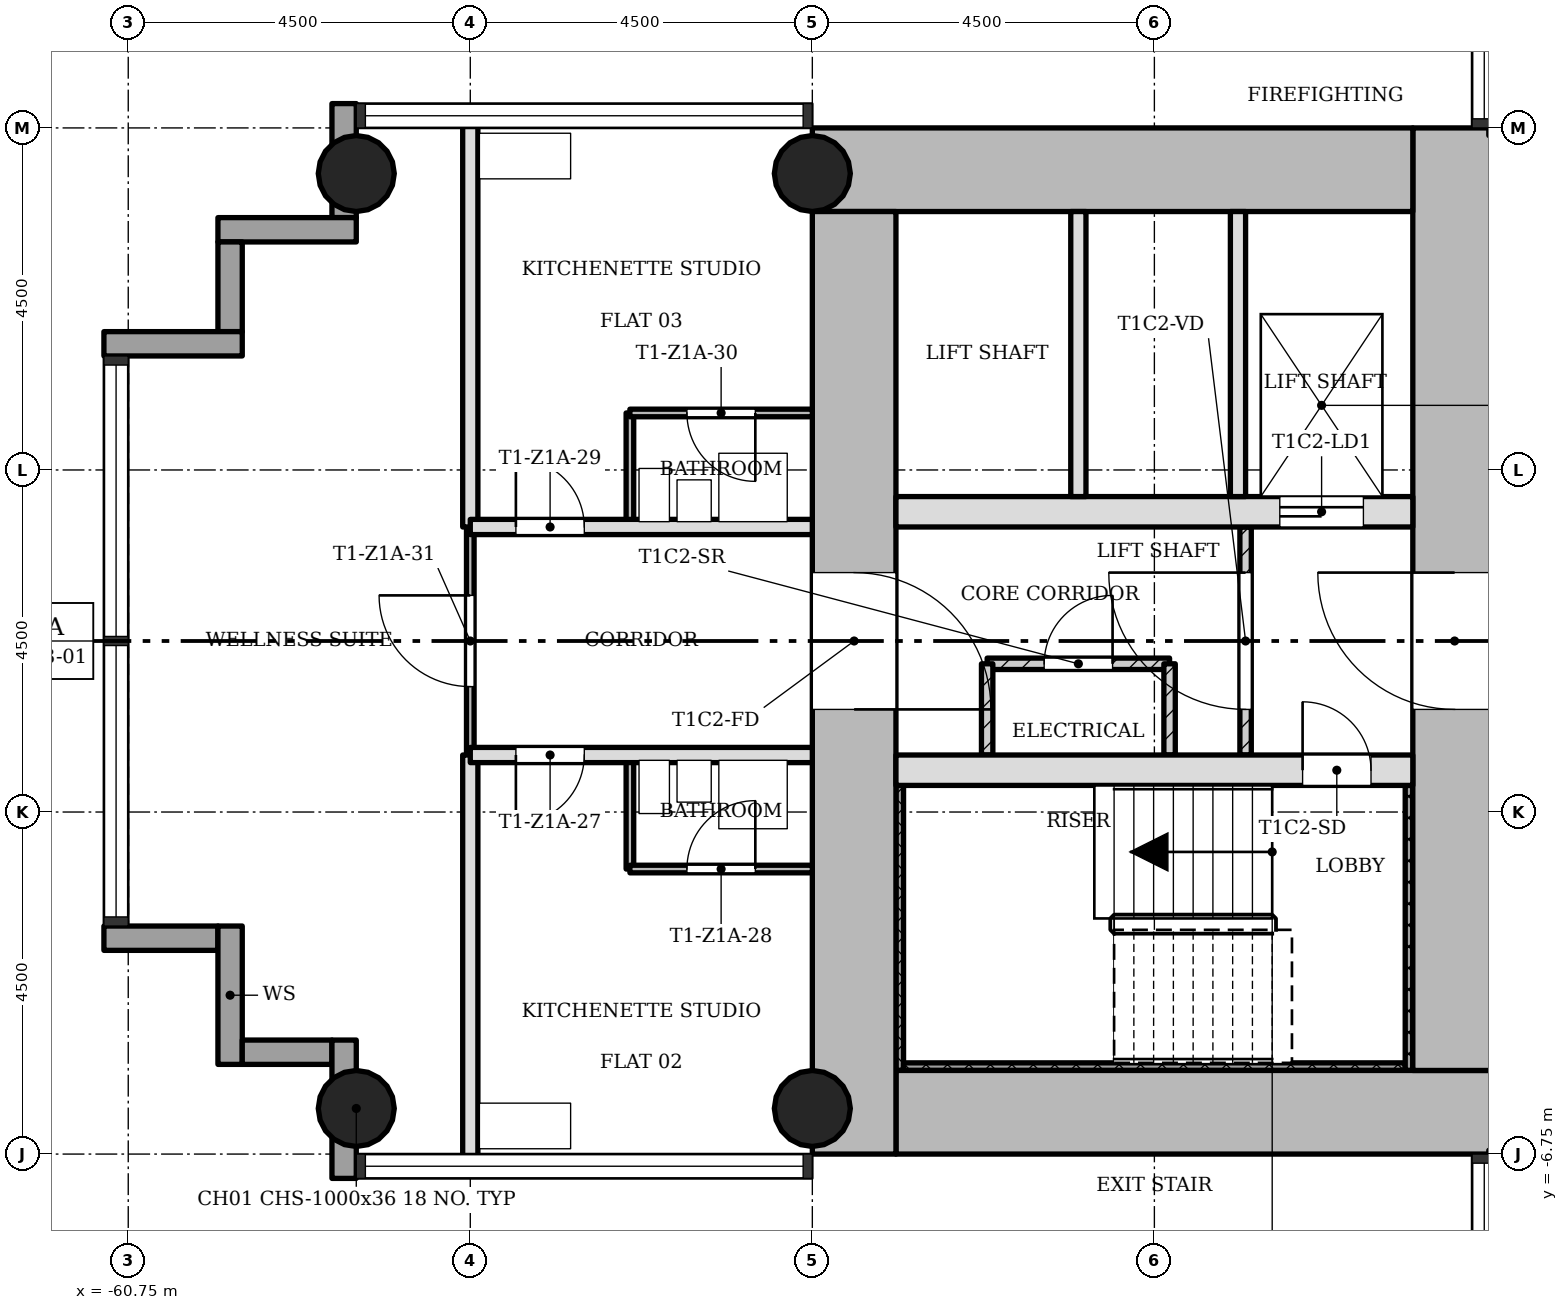
"""IFC4 building model, lengths in metres.
Left out: names, types, materials, properties, quantities, classifications, styles, units other than length and angle.
Written with IfcOpenShell. Run it as: python <this file> out.ifc"""

import sys

from ifc_helpers import new_model, si_unit, direction, frame, frame_2d, origin, origin_2d, place, context, subcontext, project, spatial, rectangle, hollow_circle, extrude, element, fill, save


model = new_model("IFC4")
c1 = context("Model", 3, precision=1e-05, world=origin(), true_north=direction((0.0, 1.0)))
c2 = subcontext(c1, "Body", "Model", "MODEL_VIEW")
j1 = project(units=[si_unit("LENGTHUNIT", "METRE"), si_unit("PLANEANGLEUNIT", "RADIAN")], contexts=[c1])
p1 = place(None, origin())
s1 = spatial("IfcSite", under=j1, at=p1, CompositionType="ELEMENT")
p2 = place(p1, origin())
s2 = spatial("IfcBuilding", under=s1, at=p2, CompositionType="ELEMENT")
p3 = place(p2, frame((0.0, 0.0, 27.9)))
s3 = spatial("IfcBuildingStorey", under=s2, at=p3, CompositionType="ELEMENT", Elevation=27.9)
p4 = place(p3, frame((-50.65, -6.2, 0.0), z_axis=(0.0, 0.0, 1.0), x_axis=(1.0, 0.0, 0.0)))
e1 = element("IfcWall", 1, at=p4, inside=s3, PredefinedType="SHEAR", context=c2, shape_type="SweptSolid", body=[
    extrude(rectangle(XDim=7.998, YDim=1.1, at=frame_2d((3.999, 0.0))), origin(), (0.0, 0.0, 1.0), 3.4),
])
p5 = place(p3, frame((-43.3, -5.65, 0.0), z_axis=(0.0, 0.0, 1.0), x_axis=(0.0, 1.0, 0.0)))
e2 = element("IfcWall", 2, at=p5, inside=s3, PredefinedType="SHEAR", context=c2, shape_type="SweptSolid", body=[
    extrude(rectangle(XDim=12.4, YDim=1.1, at=frame_2d((6.2, 0.0))), origin(), (0.0, 0.0, 1.0), 3.4),
])
p6 = place(p5, frame((4.75, 0.0, 0.0)))
e3 = element("IfcOpeningElement", 3, at=p6, cuts=e2, PredefinedType="OPENING", context=c2, shape_type="SweptSolid", body=[
    extrude(rectangle(XDim=1.8, YDim=2.1, at=frame_2d((0.9, 1.05))), frame((0.0, 0.56, 0.0), z_axis=(0.0, -1.0, 0.0), x_axis=(1.0, 0.0, 0.0)), (0.0, 0.0, 1.0), 1.12),
])
p7 = place(p3, frame((-43.85, 6.2, 0.0), z_axis=(0.0, 0.0, 1.0), x_axis=(-1.0, 0.0, 0.0)))
e4 = element("IfcWall", 4, at=p7, inside=s3, PredefinedType="SHEAR", context=c2, shape_type="SweptSolid", body=[
    extrude(rectangle(XDim=7.9, YDim=1.1, at=frame_2d((3.95, 0.0))), origin(), (0.0, 0.0, 1.0), 3.4),
])
p8 = place(p3, frame((-51.2, 5.65, 0.0), z_axis=(0.0, 0.0, 1.0), x_axis=(0.0, -1.0, 0.0)))
e5 = element("IfcWall", 5, at=p8, inside=s3, PredefinedType="SHEAR", context=c2, shape_type="SweptSolid", body=[
    extrude(rectangle(XDim=12.4, YDim=1.1, at=frame_2d((6.2, 0.0))), origin(), (0.0, 0.0, 1.0), 3.4),
])
p9 = place(p8, frame((4.75, 0.0, 0.0)))
e6 = element("IfcOpeningElement", 6, at=p9, cuts=e5, PredefinedType="OPENING", context=c2, shape_type="SweptSolid", body=[
    extrude(rectangle(XDim=1.8, YDim=2.1, at=frame_2d((0.9, 1.05))), frame((0.0, 0.56, 0.0), z_axis=(0.0, -1.0, 0.0), x_axis=(1.0, 0.0, 0.0)), (0.0, 0.0, 1.0), 1.12),
])
p10 = place(p3, frame((-50.65, -1.7, 0.0), z_axis=(0.0, 0.0, 1.0), x_axis=(1.0, 0.0, 0.0)))
e7 = element("IfcWall", 7, at=p10, inside=s3, PredefinedType="SHEAR", context=c2, shape_type="SweptSolid", body=[
    extrude(rectangle(XDim=6.8, YDim=0.4, at=frame_2d((3.4, 0.0))), origin(), (0.0, 0.0, 1.0), 3.4),
])
p11 = place(p10, frame((5.35, 0.0, 0.0)))
e8 = element("IfcOpeningElement", 8, at=p11, cuts=e7, PredefinedType="OPENING", context=c2, shape_type="SweptSolid", body=[
    extrude(rectangle(XDim=0.9, YDim=2.1, at=frame_2d((0.45, 1.05))), frame((0.0, 0.21, 0.0), z_axis=(0.0, -1.0, 0.0), x_axis=(1.0, 0.0, 0.0)), (0.0, 0.0, 1.0), 0.42),
])
p12 = place(p3, frame((-50.65, 1.7, 0.0), z_axis=(0.0, 0.0, 1.0), x_axis=(1.0, 0.0, 0.0)))
e9 = element("IfcWall", 9, at=p12, inside=s3, PredefinedType="SHEAR", context=c2, shape_type="SweptSolid", body=[
    extrude(rectangle(XDim=6.8, YDim=0.4, at=frame_2d((3.4, 0.0))), origin(), (0.0, 0.0, 1.0), 3.4),
])
p13 = place(p12, frame((5.05, 0.0, 0.0)))
e10 = element("IfcOpeningElement", 10, at=p13, cuts=e9, PredefinedType="OPENING", context=c2, shape_type="SweptSolid", body=[
    extrude(rectangle(XDim=1.1, YDim=2.1, at=frame_2d((0.55, 1.05))), frame((0.0, 0.21, 0.0), z_axis=(0.0, -1.0, 0.0), x_axis=(1.0, 0.0, 0.0)), (0.0, 0.0, 1.0), 0.42),
])
for number, where, z_axis, x_axis in (
    (11, (-51.75, -6.15, 0.0), (0.0, 0.0, 1.0), (1.0, 0.0, 0.0)),
    (12, (-51.75, 6.15, 0.0), (0.0, 0.0, 1.0), (1.0, 0.0, 0.0)),
    (13, (-57.75, -6.15, 0.0), (0.0, 0.0, 1.0), (1.0, 0.0, 0.0)),
    (14, (-57.75, 6.15, 0.0), (0.0, 0.0, 1.0), (1.0, 0.0, 0.0)),
):
    element("IfcColumn", number, at=place(p3, frame(where, z_axis=z_axis, x_axis=x_axis)), inside=s3, PredefinedType="COLUMN", context=c2, shape_type="SweptSolid", body=[
        extrude(hollow_circle(Radius=0.5, WallThickness=0.036, at=origin_2d()), origin(), (0.0, 0.0, 1.0), 3.4),
    ])
p14 = place(p3, frame((-61.07, -3.91, -0.3), z_axis=(0.0, 0.0, 1.0), x_axis=(1.0, 0.0, 0.0)))
e15 = element("IfcWall", 15, at=p14, inside=s3, PredefinedType="STANDARD", context=c2, shape_type="SweptSolid", body=[
    extrude(rectangle(XDim=1.5, YDim=0.32, at=frame_2d((0.75, 0.0))), origin(), (0.0, 0.0, 1.0), 3.4),
])
p15 = place(p3, frame((-59.41, -3.75, -0.3), z_axis=(0.0, 0.0, 1.0), x_axis=(0.0, -1.0, 0.0)))
e16 = element("IfcWall", 16, at=p15, inside=s3, PredefinedType="STANDARD", context=c2, shape_type="SweptSolid", body=[
    extrude(rectangle(XDim=1.82, YDim=0.32, at=frame_2d((0.91, 0.0))), origin(), (0.0, 0.0, 1.0), 3.4),
])
p16 = place(p3, frame((-59.25, -5.41, -0.3), z_axis=(0.0, 0.0, 1.0), x_axis=(1.0, 0.0, 0.0)))
e17 = element("IfcWall", 17, at=p16, inside=s3, PredefinedType="STANDARD", context=c2, shape_type="SweptSolid", body=[
    extrude(rectangle(XDim=1.18, YDim=0.32, at=frame_2d((0.59, 0.0))), origin(), (0.0, 0.0, 1.0), 3.4),
])
p17 = place(p3, frame((-57.91, -5.25, -0.3), z_axis=(0.0, 0.0, 1.0), x_axis=(0.0, -1.0, 0.0)))
e18 = element("IfcWall", 18, at=p17, inside=s3, PredefinedType="STANDARD", context=c2, shape_type="SweptSolid", body=[
    extrude(rectangle(XDim=1.82, YDim=0.32, at=frame_2d((0.91, 0.0))), origin(), (0.0, 0.0, 1.0), 3.4),
])
p18 = place(p3, frame((-57.91, 7.07, -0.3), z_axis=(0.0, 0.0, 1.0), x_axis=(0.0, -1.0, 0.0)))
e19 = element("IfcWall", 19, at=p18, inside=s3, PredefinedType="STANDARD", context=c2, shape_type="SweptSolid", body=[
    extrude(rectangle(XDim=1.5, YDim=0.32, at=frame_2d((0.75, 0.0))), origin(), (0.0, 0.0, 1.0), 3.4),
])
p19 = place(p3, frame((-57.75, 5.41, -0.3), z_axis=(0.0, 0.0, 1.0), x_axis=(-1.0, 0.0, 0.0)))
e20 = element("IfcWall", 20, at=p19, inside=s3, PredefinedType="STANDARD", context=c2, shape_type="SweptSolid", body=[
    extrude(rectangle(XDim=1.82, YDim=0.32, at=frame_2d((0.91, 0.0))), origin(), (0.0, 0.0, 1.0), 3.4),
])
p20 = place(p3, frame((-59.41, 5.25, -0.3), z_axis=(0.0, 0.0, 1.0), x_axis=(0.0, -1.0, 0.0)))
e21 = element("IfcWall", 21, at=p20, inside=s3, PredefinedType="STANDARD", context=c2, shape_type="SweptSolid", body=[
    extrude(rectangle(XDim=1.18, YDim=0.32, at=frame_2d((0.59, 0.0))), origin(), (0.0, 0.0, 1.0), 3.4),
])
p21 = place(p3, frame((-59.25, 3.91, -0.3), z_axis=(0.0, 0.0, 1.0), x_axis=(-1.0, 0.0, 0.0)))
e22 = element("IfcWall", 22, at=p21, inside=s3, PredefinedType="STANDARD", context=c2, shape_type="SweptSolid", body=[
    extrude(rectangle(XDim=1.82, YDim=0.32, at=frame_2d((0.91, 0.0))), origin(), (0.0, 0.0, 1.0), 3.4),
])
p22 = place(p3, frame((-46.05, 1.5, 0.0), z_axis=(0.0, 0.0, 1.0), x_axis=(0.0, -1.0, 0.0)))
e23 = element("IfcWall", 23, at=p22, inside=s3, PredefinedType="PARTITIONING", context=c2, shape_type="SweptSolid", body=[
    extrude(rectangle(XDim=3.0, YDim=0.15, at=frame_2d((1.5, 0.0))), origin(), (0.0, 0.0, 1.0), 3.0),
])
p23 = place(p22, frame((0.6, 0.0, 0.0)))
e24 = element("IfcOpeningElement", 24, at=p23, cuts=e23, PredefinedType="OPENING", context=c2, shape_type="SweptSolid", body=[
    extrude(rectangle(XDim=1.8, YDim=2.1, at=frame_2d((0.9, 1.05))), frame((0.0, 0.085, 0.0), z_axis=(0.0, -1.0, 0.0), x_axis=(1.0, 0.0, 0.0)), (0.0, 0.0, 1.0), 0.17),
])
for number, where, z_axis, x_axis in (
    (25, (-46.15, 5.65, 0.0), (0.0, 0.0, 1.0), (0.0, -1.0, 0.0)),
    (26, (-48.25, 5.65, 0.0), (0.0, 0.0, 1.0), (0.0, -1.0, 0.0)),
):
    element("IfcWall", number, at=place(p3, frame(where, z_axis=z_axis, x_axis=x_axis)), inside=s3, PredefinedType="SOLIDWALL", context=c2, shape_type="SweptSolid", body=[
        extrude(rectangle(XDim=3.75, YDim=0.2, at=frame_2d((1.875, 0.0))), origin(), (0.0, 0.0, 1.0), 3.0),
    ])
p24 = place(p3, frame((-47.05, -0.3, 0.0), z_axis=(0.0, 0.0, 1.0), x_axis=(-1.0, 0.0, 0.0)))
e27 = element("IfcWall", 27, at=p24, inside=s3, PredefinedType="PARTITIONING", context=c2, shape_type="SweptSolid", body=[
    extrude(rectangle(XDim=2.4, YDim=0.15, at=frame_2d((1.2, 0.0))), origin(), (0.0, 0.0, 1.0), 3.0),
])
p25 = place(p24, frame((0.75, 0.0, 0.0)))
e28 = element("IfcOpeningElement", 28, at=p25, cuts=e27, PredefinedType="OPENING", context=c2, shape_type="SweptSolid", body=[
    extrude(rectangle(XDim=0.9, YDim=2.1, at=frame_2d((0.45, 1.05))), frame((0.0, 0.085, 0.0), z_axis=(0.0, -1.0, 0.0), x_axis=(1.0, 0.0, 0.0)), (0.0, 0.0, 1.0), 0.17),
])
for number, where, z_axis, x_axis in (
    (29, (-47.05, -0.3, 0.0), (0.0, 0.0, 1.0), (0.0, -1.0, 0.0)),
    (30, (-49.45, -0.3, 0.0), (0.0, 0.0, 1.0), (0.0, -1.0, 0.0)),
):
    element("IfcWall", number, at=place(p3, frame(where, z_axis=z_axis, x_axis=x_axis)), inside=s3, PredefinedType="PARTITIONING", context=c2, shape_type="SweptSolid", body=[
        extrude(rectangle(XDim=1.2, YDim=0.15, at=frame_2d((0.6, 0.0))), origin(), (0.0, 0.0, 1.0), 3.0),
    ])
p26 = place(p3, frame((-56.25, -1.5, 0.0), z_axis=(0.0, 0.0, 1.0), x_axis=(0.0, 1.0, 0.0)))
e31 = element("IfcWall", 31, at=p26, inside=s3, PredefinedType="PARTITIONING", context=c2, shape_type="SweptSolid", body=[
    extrude(rectangle(XDim=3.0, YDim=0.1, at=frame_2d((1.5, 0.0))), origin(), (0.0, 0.0, 1.0), 3.0),
])
p27 = place(p26, frame((0.9, 0.0, 0.0)))
e32 = element("IfcOpeningElement", 32, at=p27, cuts=e31, PredefinedType="OPENING", context=c2, shape_type="SweptSolid", body=[
    extrude(rectangle(XDim=1.2, YDim=2.1, at=frame_2d((0.6, 1.05))), frame((0.0, 0.06, 0.0), z_axis=(0.0, -1.0, 0.0), x_axis=(1.0, 0.0, 0.0)), (0.0, 0.0, 1.0), 0.12),
])
for number, where, z_axis, x_axis in (
    (33, (-56.25, -6.85, 0.0), (0.0, 0.0, 1.0), (0.0, 1.0, 0.0)),
    (34, (-56.25, 1.5, 0.0), (0.0, 0.0, 1.0), (0.0, 1.0, 0.0)),
):
    element("IfcWall", number, at=place(p3, frame(where, z_axis=z_axis, x_axis=x_axis)), inside=s3, PredefinedType="SOLIDWALL", context=c2, shape_type="SweptSolid", body=[
        extrude(rectangle(XDim=5.35, YDim=0.2, at=frame_2d((2.675, 0.0))), origin(), (0.0, 0.0, 1.0), 3.0),
    ])
for number, where, z_axis, x_axis in (
    (35, (-54.15, -3.0, 0.0), (0.0, 0.0, 1.0), (0.0, 1.0, 0.0)),
    (36, (-54.15, 1.5, 0.0), (0.0, 0.0, 1.0), (0.0, 1.0, 0.0)),
):
    element("IfcWall", number, at=place(p3, frame(where, z_axis=z_axis, x_axis=x_axis)), inside=s3, PredefinedType="PARTITIONING", context=c2, shape_type="SweptSolid", body=[
        extrude(rectangle(XDim=1.5, YDim=0.1, at=frame_2d((0.75, 0.0))), origin(), (0.0, 0.0, 1.0), 3.0),
    ])
p28 = place(p3, frame((-54.15, -3.0, 0.0), z_axis=(0.0, 0.0, 1.0), x_axis=(1.0, 0.0, 0.0)))
e37 = element("IfcWall", 37, at=p28, inside=s3, PredefinedType="PARTITIONING", context=c2, shape_type="SweptSolid", body=[
    extrude(rectangle(XDim=2.4, YDim=0.1, at=frame_2d((1.2, 0.0))), origin(), (0.0, 0.0, 1.0), 3.0),
])
p29 = place(p28, frame((0.75, 0.0, 0.0)))
e38 = element("IfcOpeningElement", 38, at=p29, cuts=e37, PredefinedType="OPENING", context=c2, shape_type="SweptSolid", body=[
    extrude(rectangle(XDim=0.9, YDim=2.1, at=frame_2d((0.45, 1.05))), frame((0.0, 0.06, 0.0), z_axis=(0.0, -1.0, 0.0), x_axis=(1.0, 0.0, 0.0)), (0.0, 0.0, 1.0), 0.12),
])
p30 = place(p3, frame((-56.25, -1.5, 0.0), z_axis=(0.0, 0.0, 1.0), x_axis=(1.0, 0.0, 0.0)))
e39 = element("IfcWall", 39, at=p30, inside=s3, PredefinedType="SOLIDWALL", context=c2, shape_type="SweptSolid", body=[
    extrude(rectangle(XDim=4.5, YDim=0.2, at=frame_2d((2.25, 0.0))), origin(), (0.0, 0.0, 1.0), 3.0),
])
p31 = place(p30, frame((0.6, 0.0, 0.0)))
e40 = element("IfcOpeningElement", 40, at=p31, cuts=e39, PredefinedType="OPENING", context=c2, shape_type="SweptSolid", body=[
    extrude(rectangle(XDim=0.9, YDim=2.1, at=frame_2d((0.45, 1.05))), frame((0.0, 0.11, 0.0), z_axis=(0.0, -1.0, 0.0), x_axis=(1.0, 0.0, 0.0)), (0.0, 0.0, 1.0), 0.22),
])
p32 = place(p3, frame((-56.25, 1.5, 0.0), z_axis=(0.0, 0.0, 1.0), x_axis=(1.0, 0.0, 0.0)))
e41 = element("IfcWall", 41, at=p32, inside=s3, PredefinedType="SOLIDWALL", context=c2, shape_type="SweptSolid", body=[
    extrude(rectangle(XDim=4.5, YDim=0.2, at=frame_2d((2.25, 0.0))), origin(), (0.0, 0.0, 1.0), 3.0),
])
p33 = place(p32, frame((0.6, 0.0, 0.0)))
e42 = element("IfcOpeningElement", 42, at=p33, cuts=e41, PredefinedType="OPENING", context=c2, shape_type="SweptSolid", body=[
    extrude(rectangle(XDim=0.9, YDim=2.1, at=frame_2d((0.45, 1.05))), frame((0.0, 0.11, 0.0), z_axis=(0.0, -1.0, 0.0), x_axis=(1.0, 0.0, 0.0)), (0.0, 0.0, 1.0), 0.22),
])
p34 = place(p3, frame((-54.15, 3.0, 0.0), z_axis=(0.0, 0.0, 1.0), x_axis=(1.0, 0.0, 0.0)))
e43 = element("IfcWall", 43, at=p34, inside=s3, PredefinedType="PARTITIONING", context=c2, shape_type="SweptSolid", body=[
    extrude(rectangle(XDim=2.4, YDim=0.1, at=frame_2d((1.2, 0.0))), origin(), (0.0, 0.0, 1.0), 3.0),
])
p35 = place(p34, frame((0.75, 0.0, 0.0)))
e44 = element("IfcOpeningElement", 44, at=p35, cuts=e43, PredefinedType="OPENING", context=c2, shape_type="SweptSolid", body=[
    extrude(rectangle(XDim=0.9, YDim=2.1, at=frame_2d((0.45, 1.05))), frame((0.0, 0.06, 0.0), z_axis=(0.0, -1.0, 0.0), x_axis=(1.0, 0.0, 0.0)), (0.0, 0.0, 1.0), 0.12),
])
p36 = place(p3, frame((-50.6, -1.9, 0.0), z_axis=(0.0, 0.0, 1.0), x_axis=(0.0, -1.0, 0.0)))
e45 = element("IfcWall", 45, at=p36, inside=s3, PredefinedType="SHEAR", context=c2, shape_type="SweptSolid", body=[
    extrude(rectangle(XDim=3.75, YDim=0.1, at=frame_2d((1.875, 0.0))), origin(), (0.0, 0.0, 1.0), 3.4),
])
p37 = place(p3, frame((-43.95, -5.6, 0.0), z_axis=(0.0, 0.0, 1.0), x_axis=(-1.0, 0.0, 0.0)))
e46 = element("IfcWall", 46, at=p37, inside=s3, PredefinedType="SHEAR", context=c2, shape_type="SweptSolid", body=[
    extrude(rectangle(XDim=6.6, YDim=0.1, at=frame_2d((3.3, 0.0))), origin(), (0.0, 0.0, 1.0), 3.4),
])
p38 = place(p3, frame((-43.9, -1.9, 0.0), z_axis=(0.0, 0.0, 1.0), x_axis=(0.0, -1.0, 0.0)))
e47 = element("IfcWall", 47, at=p38, inside=s3, PredefinedType="SHEAR", context=c2, shape_type="SweptSolid", body=[
    extrude(rectangle(XDim=3.75, YDim=0.1, at=frame_2d((1.875, 0.0))), origin(), (0.0, 0.0, 1.0), 3.4),
])
p39 = place(p23, origin())
e48 = element("IfcDoor", 48, at=p39, inside=s3, OperationType="SINGLE_SWING_LEFT", PredefinedType="DOOR", context=c2, shape_type="SweptSolid", body=[
    extrude(rectangle(XDim=1.8, YDim=2.1, at=frame_2d((0.9, 1.05))), frame((0.0, 0.025, 0.0), z_axis=(0.0, -1.0, 0.0), x_axis=(1.0, 0.0, 0.0)), (0.0, 0.0, 1.0), 0.05),
])
fill(e24, e48)
p40 = place(p25, origin())
e49 = element("IfcDoor", 49, at=p40, inside=s3, OperationType="SINGLE_SWING_LEFT", PredefinedType="DOOR", context=c2, shape_type="SweptSolid", body=[
    extrude(rectangle(XDim=0.9, YDim=2.1, at=frame_2d((0.45, 1.05))), frame((0.0, 0.025, 0.0), z_axis=(0.0, -1.0, 0.0), x_axis=(1.0, 0.0, 0.0)), (0.0, 0.0, 1.0), 0.05),
])
fill(e28, e49)
p41 = place(p31, origin())
e50 = element("IfcDoor", 50, at=p41, inside=s3, OperationType="SINGLE_SWING_LEFT", PredefinedType="DOOR", context=c2, shape_type="SweptSolid", body=[
    extrude(rectangle(XDim=0.9, YDim=2.1, at=frame_2d((0.45, 1.05))), frame((0.0, 0.025, 0.0), z_axis=(0.0, -1.0, 0.0), x_axis=(1.0, 0.0, 0.0)), (0.0, 0.0, 1.0), 0.05),
])
fill(e40, e50)
p42 = place(p29, origin())
e51 = element("IfcDoor", 51, at=p42, inside=s3, OperationType="SINGLE_SWING_LEFT", PredefinedType="DOOR", context=c2, shape_type="SweptSolid", body=[
    extrude(rectangle(XDim=0.9, YDim=2.1, at=frame_2d((0.45, 1.05))), frame((0.0, 0.025, 0.0), z_axis=(0.0, -1.0, 0.0), x_axis=(1.0, 0.0, 0.0)), (0.0, 0.0, 1.0), 0.05),
])
fill(e38, e51)
p43 = place(p33, origin())
e52 = element("IfcDoor", 52, at=p43, inside=s3, OperationType="SINGLE_SWING_RIGHT", PredefinedType="DOOR", context=c2, shape_type="SweptSolid", body=[
    extrude(rectangle(XDim=0.9, YDim=2.1, at=frame_2d((0.45, 1.05))), frame((0.0, 0.025, 0.0), z_axis=(0.0, -1.0, 0.0), x_axis=(1.0, 0.0, 0.0)), (0.0, 0.0, 1.0), 0.05),
])
fill(e42, e52)
p44 = place(p35, origin())
e53 = element("IfcDoor", 53, at=p44, inside=s3, OperationType="SINGLE_SWING_RIGHT", PredefinedType="DOOR", context=c2, shape_type="SweptSolid", body=[
    extrude(rectangle(XDim=0.9, YDim=2.1, at=frame_2d((0.45, 1.05))), frame((0.0, 0.025, 0.0), z_axis=(0.0, -1.0, 0.0), x_axis=(1.0, 0.0, 0.0)), (0.0, 0.0, 1.0), 0.05),
])
fill(e44, e53)
p45 = place(p27, origin())
e54 = element("IfcDoor", 54, at=p45, inside=s3, OperationType="SINGLE_SWING_LEFT", PredefinedType="DOOR", context=c2, shape_type="SweptSolid", body=[
    extrude(rectangle(XDim=1.2, YDim=2.1, at=frame_2d((0.6, 1.05))), frame((0.0, 0.025, 0.0), z_axis=(0.0, -1.0, 0.0), x_axis=(1.0, 0.0, 0.0)), (0.0, 0.0, 1.0), 0.05),
])
fill(e32, e54)
p46 = place(p11, origin())
e55 = element("IfcDoor", 55, at=p46, inside=s3, OperationType="SINGLE_SWING_RIGHT", PredefinedType="DOOR", context=c2, shape_type="SweptSolid", body=[
    extrude(rectangle(XDim=0.9, YDim=2.1, at=frame_2d((0.45, 1.05))), frame((0.0, 0.025, 0.0), z_axis=(0.0, -1.0, 0.0), x_axis=(1.0, 0.0, 0.0)), (0.0, 0.0, 1.0), 0.05),
])
fill(e8, e55)
p47 = place(p13, origin())
e56 = element("IfcDoor", 56, at=p47, inside=s3, OperationType="SLIDING_TO_LEFT", PredefinedType="DOOR", context=c2, shape_type="SweptSolid", body=[
    extrude(rectangle(XDim=1.1, YDim=2.1, at=frame_2d((0.55, 1.05))), frame((0.0, 0.025, 0.0), z_axis=(0.0, -1.0, 0.0), x_axis=(1.0, 0.0, 0.0)), (0.0, 0.0, 1.0), 0.05),
])
fill(e10, e56)
p48 = place(p6, origin())
e57 = element("IfcDoor", 57, at=p48, inside=s3, OperationType="SINGLE_SWING_LEFT", PredefinedType="DOOR", context=c2, shape_type="SweptSolid", body=[
    extrude(rectangle(XDim=1.8, YDim=2.1, at=frame_2d((0.9, 1.05))), frame((0.0, 0.025, 0.0), z_axis=(0.0, -1.0, 0.0), x_axis=(1.0, 0.0, 0.0)), (0.0, 0.0, 1.0), 0.05),
])
fill(e3, e57)
p49 = place(p9, origin())
e58 = element("IfcDoor", 58, at=p49, inside=s3, OperationType="SINGLE_SWING_LEFT", PredefinedType="DOOR", context=c2, shape_type="SweptSolid", body=[
    extrude(rectangle(XDim=1.8, YDim=2.1, at=frame_2d((0.9, 1.05))), frame((0.0, 0.025, 0.0), z_axis=(0.0, -1.0, 0.0), x_axis=(1.0, 0.0, 0.0)), (0.0, 0.0, 1.0), 0.05),
])
fill(e6, e58)
save(model, sys.argv[1])
